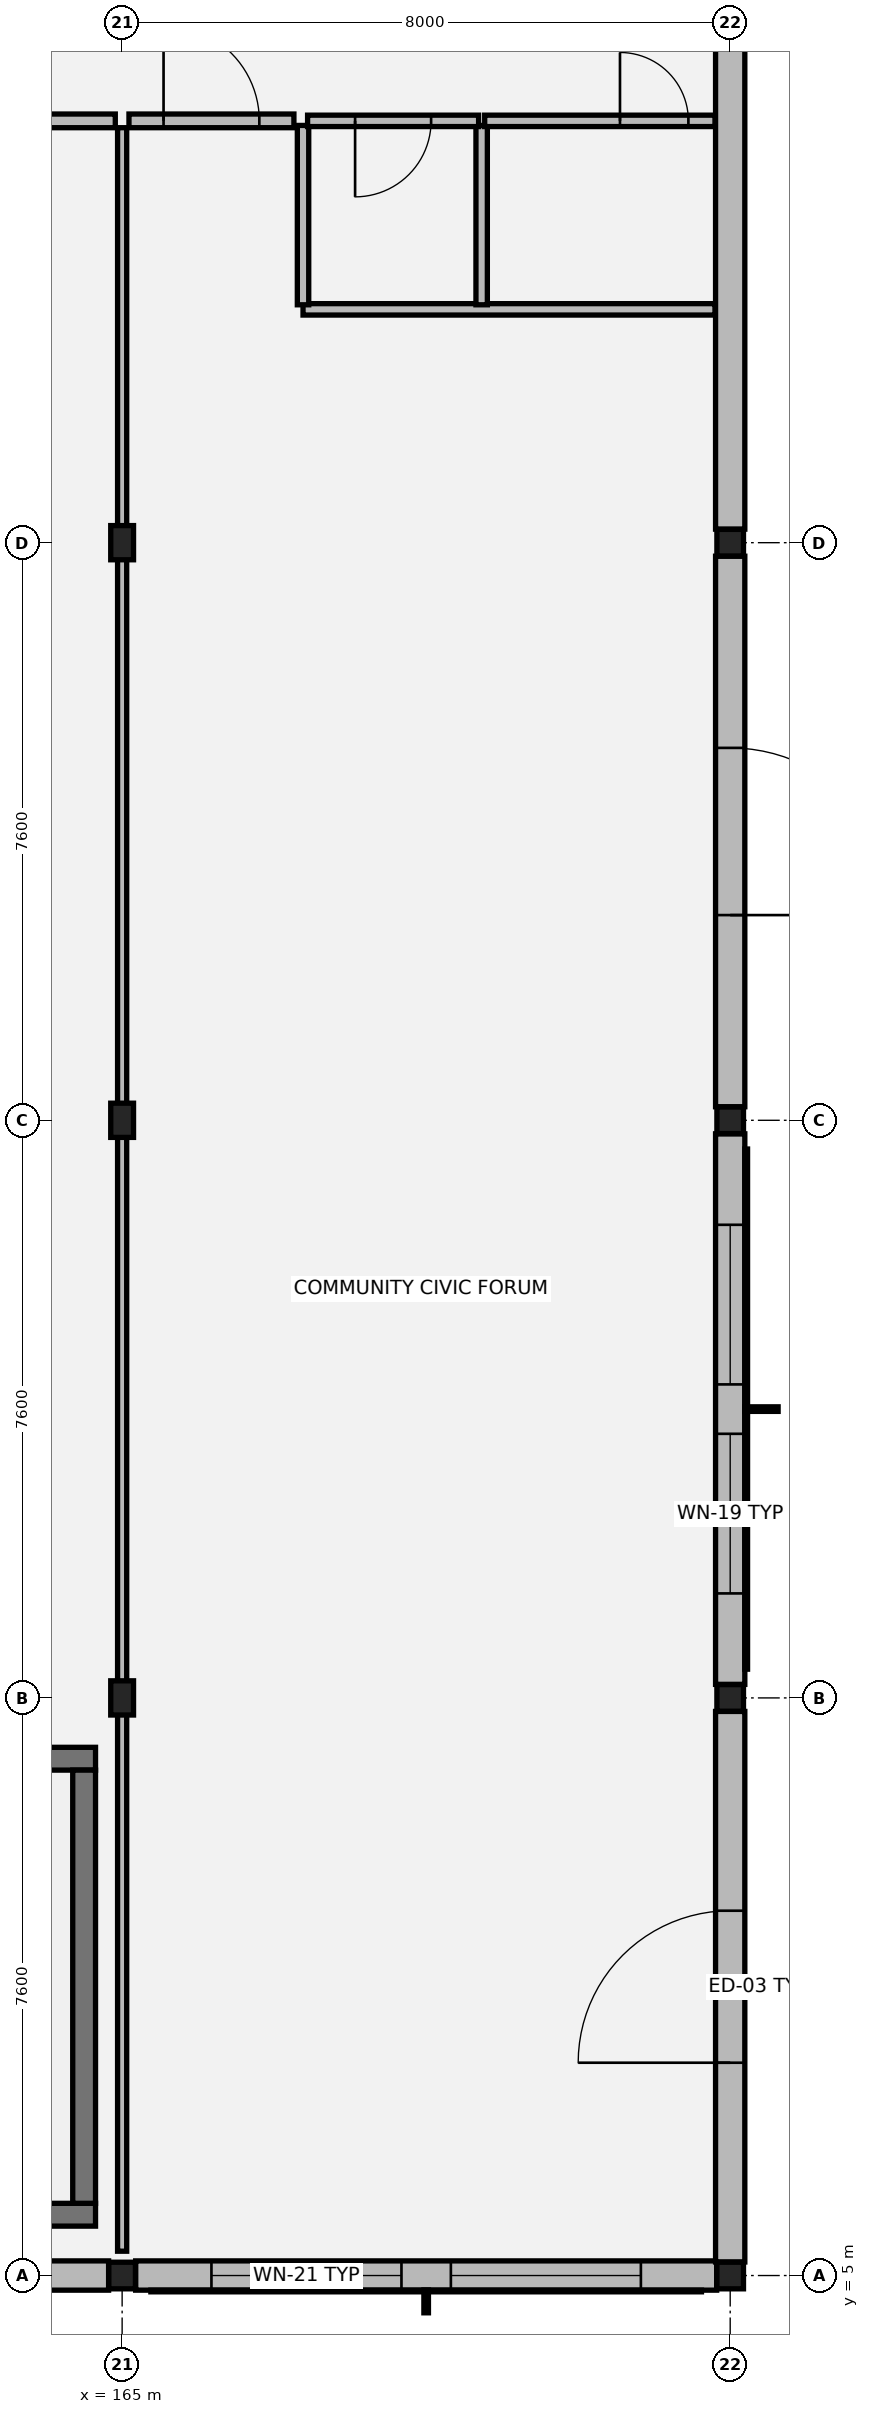
"""IFC4 building model, lengths in metres.
Left out: names, types, materials, properties, quantities, classifications, styles, units other than length and angle.
Written with IfcOpenShell. Run it as: python <this file> out.ifc"""

import sys

from ifc_helpers import new_model, si_unit, direction, frame, frame_2d, origin, origin_2d, place, context, subcontext, project, spatial, rectangle, hollow_rectangle, i_section, extrude, element, fill, save


model = new_model("IFC4")
c1 = context("Model", 3, precision=1e-05, world=origin(), true_north=direction((0.0, 1.0)))
c2 = subcontext(c1, "Body", "Model", "MODEL_VIEW")
j1 = project(units=[si_unit("LENGTHUNIT", "METRE"), si_unit("PLANEANGLEUNIT", "RADIAN")], contexts=[c1])
p1 = place(None, origin())
s1 = spatial("IfcSite", under=j1, at=p1, CompositionType="ELEMENT")
p2 = place(p1, origin())
s2 = spatial("IfcBuilding", under=s1, at=p2, CompositionType="ELEMENT")
p3 = place(p2, origin())
s3 = spatial("IfcBuildingStorey", under=s2, at=p3, CompositionType="ELEMENT", Elevation=0.0)
p4 = place(p3, frame((165.0, 5.0, 0.0), z_axis=(0.0, 0.0, 1.0), x_axis=(1.0, 0.0, 0.0)))
e1 = element("IfcColumn", 1, at=p4, inside=s3, PredefinedType="COLUMN", context=c2, shape_type="SweptSolid", body=[
    extrude(hollow_rectangle(XDim=0.35, YDim=0.35, WallThickness=0.014, at=origin_2d()), origin(), (0.0, 0.0, 1.0), 5.075),
])
for number, where, z_axis, x_axis in (
    (2, (165.0, 12.6, 0.0), (0.0, 0.0, 1.0), (1.0, 0.0, 0.0)),
    (3, (165.0, 20.2, 0.0), (0.0, 0.0, 1.0), (1.0, 0.0, 0.0)),
    (4, (165.0, 27.8, 0.0), (0.0, 0.0, 1.0), (1.0, 0.0, 0.0)),
):
    element("IfcColumn", number, at=place(p3, frame(where, z_axis=z_axis, x_axis=x_axis)), inside=s3, PredefinedType="COLUMN", context=c2, shape_type="SweptSolid", body=[
        extrude(i_section(OverallWidth=0.3, OverallDepth=0.45, WebThickness=0.014, FlangeThickness=0.026, at=origin_2d()), origin(), (0.0, 0.0, 1.0), 5.075),
    ])
for number, where, z_axis, x_axis in (
    (5, (173.0, 5.0, 0.0), (0.0, 0.0, 1.0), (1.0, 0.0, 0.0)),
    (6, (173.0, 12.6, 0.0), (0.0, 0.0, 1.0), (1.0, 0.0, 0.0)),
    (7, (173.0, 20.2, 0.0), (0.0, 0.0, 1.0), (1.0, 0.0, 0.0)),
    (8, (173.0, 27.8, 0.0), (0.0, 0.0, 1.0), (1.0, 0.0, 0.0)),
):
    element("IfcColumn", number, at=place(p3, frame(where, z_axis=z_axis, x_axis=x_axis)), inside=s3, PredefinedType="COLUMN", context=c2, shape_type="SweptSolid", body=[
        extrude(hollow_rectangle(XDim=0.35, YDim=0.35, WallThickness=0.014, at=origin_2d()), origin(), (0.0, 0.0, 1.0), 5.075),
    ])
p5 = place(p3, frame((157.178, 5.0, 0.0), z_axis=(0.0, 0.0, 1.0), x_axis=(1.0, 0.0, 0.0)))
e9 = element("IfcWall", 9, at=p5, inside=s3, PredefinedType="SOLIDWALL", context=c2, shape_type="SweptSolid", body=[
    extrude(rectangle(XDim=7.644, YDim=0.385, at=frame_2d((3.822, 0.0))), origin(), (0.0, 0.0, 1.0), 4.5),
])
p6 = place(p5, frame((2.872, 0.0, 0.0)))
e10 = element("IfcOpeningElement", 10, at=p6, cuts=e9, PredefinedType="OPENING", context=c2, shape_type="SweptSolid", body=[
    extrude(rectangle(XDim=1.9, YDim=2.42, at=frame_2d((0.95, 1.21))), frame((0.0, 0.202, 0.0), z_axis=(0.0, -1.0, 0.0), x_axis=(1.0, 0.0, 0.0)), (0.0, 0.0, 1.0), 0.405),
])
p7 = place(p3, frame((165.178, 5.0, 0.0), z_axis=(0.0, 0.0, 1.0), x_axis=(1.0, 0.0, 0.0)))
e11 = element("IfcWall", 11, at=p7, inside=s3, PredefinedType="SOLIDWALL", context=c2, shape_type="SweptSolid", body=[
    extrude(rectangle(XDim=7.644, YDim=0.385, at=frame_2d((3.822, 0.0))), origin(), (0.0, 0.0, 1.0), 4.5),
])
p8 = place(p7, frame((0.997, 0.0, 0.8)))
e12 = element("IfcOpeningElement", 12, at=p8, cuts=e11, PredefinedType="OPENING", context=c2, shape_type="SweptSolid", body=[
    extrude(rectangle(XDim=2.5, YDim=2.85, at=frame_2d((1.25, 1.425))), frame((0.0, 0.202, 0.0), z_axis=(0.0, -1.0, 0.0), x_axis=(1.0, 0.0, 0.0)), (0.0, 0.0, 1.0), 0.405),
])
p9 = place(p7, frame((4.147, 0.0, 0.8)))
e13 = element("IfcOpeningElement", 13, at=p9, cuts=e11, PredefinedType="OPENING", context=c2, shape_type="SweptSolid", body=[
    extrude(rectangle(XDim=2.5, YDim=2.85, at=frame_2d((1.25, 1.425))), frame((0.0, 0.202, 0.0), z_axis=(0.0, -1.0, 0.0), x_axis=(1.0, 0.0, 0.0)), (0.0, 0.0, 1.0), 0.405),
])
p10 = place(p3, frame((173.0, 5.178, 0.0), z_axis=(0.0, 0.0, 1.0), x_axis=(0.0, 1.0, 0.0)))
e14 = element("IfcWall", 14, at=p10, inside=s3, PredefinedType="SOLIDWALL", context=c2, shape_type="SweptSolid", body=[
    extrude(rectangle(XDim=7.244, YDim=0.385, at=frame_2d((3.622, 0.0))), origin(), (0.0, 0.0, 1.0), 4.5),
])
p11 = place(p10, frame((2.622, 0.0, 0.0)))
e15 = element("IfcOpeningElement", 15, at=p11, cuts=e14, PredefinedType="OPENING", context=c2, shape_type="SweptSolid", body=[
    extrude(rectangle(XDim=2.0, YDim=2.45, at=frame_2d((1.0, 1.225))), frame((0.0, 0.202, 0.0), z_axis=(0.0, -1.0, 0.0), x_axis=(1.0, 0.0, 0.0)), (0.0, 0.0, 1.0), 0.405),
])
p12 = place(p3, frame((173.0, 12.778, 0.0), z_axis=(0.0, 0.0, 1.0), x_axis=(0.0, 1.0, 0.0)))
e16 = element("IfcWall", 16, at=p12, inside=s3, PredefinedType="SOLIDWALL", context=c2, shape_type="SweptSolid", body=[
    extrude(rectangle(XDim=7.244, YDim=0.385, at=frame_2d((3.622, 0.0))), origin(), (0.0, 0.0, 1.0), 4.5),
])
p13 = place(p12, frame((1.197, 0.0, 0.8)))
e17 = element("IfcOpeningElement", 17, at=p13, cuts=e16, PredefinedType="OPENING", context=c2, shape_type="SweptSolid", body=[
    extrude(rectangle(XDim=2.1, YDim=2.25, at=frame_2d((1.05, 1.125))), frame((0.0, 0.202, 0.0), z_axis=(0.0, -1.0, 0.0), x_axis=(1.0, 0.0, 0.0)), (0.0, 0.0, 1.0), 0.405),
])
p14 = place(p12, frame((3.947, 0.0, 0.8)))
e18 = element("IfcOpeningElement", 18, at=p14, cuts=e16, PredefinedType="OPENING", context=c2, shape_type="SweptSolid", body=[
    extrude(rectangle(XDim=2.1, YDim=2.25, at=frame_2d((1.05, 1.125))), frame((0.0, 0.202, 0.0), z_axis=(0.0, -1.0, 0.0), x_axis=(1.0, 0.0, 0.0)), (0.0, 0.0, 1.0), 0.405),
])
p15 = place(p3, frame((173.0, 20.378, 0.0), z_axis=(0.0, 0.0, 1.0), x_axis=(0.0, 1.0, 0.0)))
e19 = element("IfcWall", 19, at=p15, inside=s3, PredefinedType="SOLIDWALL", context=c2, shape_type="SweptSolid", body=[
    extrude(rectangle(XDim=7.244, YDim=0.385, at=frame_2d((3.622, 0.0))), origin(), (0.0, 0.0, 1.0), 4.5),
])
p16 = place(p15, frame((2.522, 0.0, 0.0)))
e20 = element("IfcOpeningElement", 20, at=p16, cuts=e19, PredefinedType="OPENING", context=c2, shape_type="SweptSolid", body=[
    extrude(rectangle(XDim=2.2, YDim=2.5, at=frame_2d((1.1, 1.25))), frame((0.0, 0.202, 0.0), z_axis=(0.0, -1.0, 0.0), x_axis=(1.0, 0.0, 0.0)), (0.0, 0.0, 1.0), 0.405),
])
p17 = place(p3, frame((173.0, 27.978, 0.0), z_axis=(0.0, 0.0, 1.0), x_axis=(0.0, 1.0, 0.0)))
e21 = element("IfcWall", 21, at=p17, inside=s3, PredefinedType="SOLIDWALL", context=c2, shape_type="SweptSolid", body=[
    extrude(rectangle(XDim=7.244, YDim=0.385, at=frame_2d((3.622, 0.0))), origin(), (0.0, 0.0, 1.0), 4.5),
])
p18 = place(p3, frame((157.35, 5.8, 0.0), z_axis=(0.0, 0.0, 1.0), x_axis=(1.0, 0.0, 0.0)))
e22 = element("IfcWall", 22, at=p18, inside=s3, PredefinedType="SHEAR", context=c2, shape_type="SweptSolid", body=[
    extrude(rectangle(XDim=7.3, YDim=0.3, at=frame_2d((3.65, 0.0))), origin(), (0.0, 0.0, 1.0), 4.865),
])
p19 = place(p3, frame((157.35, 11.8, 0.0), z_axis=(0.0, 0.0, 1.0), x_axis=(1.0, 0.0, 0.0)))
e23 = element("IfcWall", 23, at=p19, inside=s3, PredefinedType="SHEAR", context=c2, shape_type="SweptSolid", body=[
    extrude(rectangle(XDim=7.3, YDim=0.3, at=frame_2d((3.65, 0.0))), origin(), (0.0, 0.0, 1.0), 4.865),
])
p20 = place(p19, frame((0.33, 0.0, 0.0)))
e24 = element("IfcOpeningElement", 24, at=p20, cuts=e23, PredefinedType="OPENING", context=c2, shape_type="SweptSolid", body=[
    extrude(rectangle(XDim=1.18, YDim=2.18, at=frame_2d((0.59, 1.09))), frame((0.0, 0.16, 0.0), z_axis=(0.0, -1.0, 0.0), x_axis=(1.0, 0.0, 0.0)), (0.0, 0.0, 1.0), 0.32),
])
p21 = place(p3, frame((164.5, 5.95, 0.0), z_axis=(0.0, 0.0, 1.0), x_axis=(0.0, 1.0, 0.0)))
e25 = element("IfcWall", 25, at=p21, inside=s3, PredefinedType="SHEAR", context=c2, shape_type="SweptSolid", body=[
    extrude(rectangle(XDim=5.7, YDim=0.3, at=frame_2d((2.85, 0.0))), origin(), (0.0, 0.0, 1.0), 4.865),
])
p22 = place(p3, frame((167.38, 30.87, 0.0), z_axis=(0.0, 0.0, 1.0), x_axis=(1.0, 0.0, 0.0)))
e26 = element("IfcWall", 26, at=p22, inside=s3, PredefinedType="PARTITIONING", context=c2, shape_type="SweptSolid", body=[
    extrude(rectangle(XDim=5.42, YDim=0.15, at=frame_2d((2.71, 0.0))), origin(), (0.0, 0.0, 1.0), 4.2),
])
for number, where, z_axis, x_axis in (
    (27, (167.38, 30.93, 0.0), (0.0, 0.0, 1.0), (0.0, 1.0, 0.0)),
    (28, (169.73, 30.93, 0.0), (0.0, 0.0, 1.0), (0.0, 1.0, 0.0)),
):
    element("IfcWall", number, at=place(p3, frame(where, z_axis=z_axis, x_axis=x_axis)), inside=s3, PredefinedType="PARTITIONING", context=c2, shape_type="SweptSolid", body=[
        extrude(rectangle(XDim=2.36, YDim=0.15, at=frame_2d((1.18, 0.0))), origin(), (0.0, 0.0, 1.0), 4.2),
    ])
p23 = place(p3, frame((167.44, 33.35, 0.0), z_axis=(0.0, 0.0, 1.0), x_axis=(1.0, 0.0, 0.0)))
e29 = element("IfcWall", 29, at=p23, inside=s3, PredefinedType="PARTITIONING", context=c2, shape_type="SweptSolid", body=[
    extrude(rectangle(XDim=2.25, YDim=0.15, at=frame_2d((1.125, 0.0))), origin(), (0.0, 0.0, 1.0), 4.2),
])
p24 = place(p23, frame((0.625, 0.0, 0.0)))
e30 = element("IfcOpeningElement", 30, at=p24, cuts=e29, PredefinedType="OPENING", context=c2, shape_type="SweptSolid", body=[
    extrude(rectangle(XDim=1.0, YDim=2.15, at=frame_2d((0.5, 1.075))), frame((0.0, 0.085, 0.0), z_axis=(0.0, -1.0, 0.0), x_axis=(1.0, 0.0, 0.0)), (0.0, 0.0, 1.0), 0.17),
])
p25 = place(p3, frame((169.77, 33.35, 0.0), z_axis=(0.0, 0.0, 1.0), x_axis=(1.0, 0.0, 0.0)))
e31 = element("IfcWall", 31, at=p25, inside=s3, PredefinedType="PARTITIONING", context=c2, shape_type="SweptSolid", body=[
    extrude(rectangle(XDim=3.03, YDim=0.15, at=frame_2d((1.515, 0.0))), origin(), (0.0, 0.0, 1.0), 4.2),
])
p26 = place(p25, frame((1.78, 0.0, 0.0)))
e32 = element("IfcOpeningElement", 32, at=p26, cuts=e31, PredefinedType="OPENING", context=c2, shape_type="SweptSolid", body=[
    extrude(rectangle(XDim=0.9, YDim=2.15, at=frame_2d((0.45, 1.075))), frame((0.0, 0.085, 0.0), z_axis=(0.0, -1.0, 0.0), x_axis=(1.0, 0.0, 0.0)), (0.0, 0.0, 1.0), 0.17),
])
p27 = place(p3, frame((159.85, 33.35, 0.0), z_axis=(0.0, 0.0, 1.0), x_axis=(1.0, 0.0, 0.0)))
e33 = element("IfcWall", 33, at=p27, inside=s3, PredefinedType="PARTITIONING", context=c2, shape_type="SweptSolid", body=[
    extrude(rectangle(XDim=5.06, YDim=0.18, at=frame_2d((2.53, 0.0))), origin(), (0.0, 0.0, 1.0), 4.2),
])
p28 = place(p3, frame((165.09, 33.35, 0.0), z_axis=(0.0, 0.0, 1.0), x_axis=(1.0, 0.0, 0.0)))
e34 = element("IfcWall", 34, at=p28, inside=s3, PredefinedType="PARTITIONING", context=c2, shape_type="SweptSolid", body=[
    extrude(rectangle(XDim=2.17, YDim=0.18, at=frame_2d((1.085, 0.0))), origin(), (0.0, 0.0, 1.0), 4.2),
])
p29 = place(p28, frame((0.455, 0.0, 0.0)))
e35 = element("IfcOpeningElement", 35, at=p29, cuts=e34, PredefinedType="OPENING", context=c2, shape_type="SweptSolid", body=[
    extrude(rectangle(XDim=1.26, YDim=2.2, at=frame_2d((0.63, 1.1))), frame((0.0, 0.1, 0.0), z_axis=(0.0, -1.0, 0.0), x_axis=(1.0, 0.0, 0.0)), (0.0, 0.0, 1.0), 0.2),
])
p30 = place(p3, frame((165.0, 5.32, 0.0), z_axis=(0.0, 0.0, 1.0), x_axis=(0.0, 1.0, 0.0)))
e36 = element("IfcWall", 36, at=p30, inside=s3, PredefinedType="PARTITIONING", context=c2, shape_type="SweptSolid", body=[
    extrude(rectangle(XDim=27.94, YDim=0.12, at=frame_2d((13.97, 0.0))), origin(), (0.0, 0.0, 1.0), 4.2),
])
p31 = place(p8, origin())
e37 = element("IfcWindow", 37, at=p31, inside=s3, PartitioningType="SINGLE_PANEL", PredefinedType="WINDOW", context=c2, shape_type="SweptSolid", body=[
    extrude(rectangle(XDim=2.5, YDim=2.85, at=frame_2d((1.25, 1.425))), frame((0.0, 0.03, 0.0), z_axis=(0.0, -1.0, 0.0), x_axis=(1.0, 0.0, 0.0)), (0.0, 0.0, 1.0), 0.06),
])
fill(e12, e37)
p32 = place(p9, origin())
e38 = element("IfcWindow", 38, at=p32, inside=s3, PartitioningType="SINGLE_PANEL", PredefinedType="WINDOW", context=c2, shape_type="SweptSolid", body=[
    extrude(rectangle(XDim=2.5, YDim=2.85, at=frame_2d((1.25, 1.425))), frame((0.0, 0.03, 0.0), z_axis=(0.0, -1.0, 0.0), x_axis=(1.0, 0.0, 0.0)), (0.0, 0.0, 1.0), 0.06),
])
fill(e13, e38)
p33 = place(p11, origin())
e39 = element("IfcDoor", 39, at=p33, inside=s3, OperationType="SINGLE_SWING_LEFT", PredefinedType="DOOR", context=c2, shape_type="SweptSolid", body=[
    extrude(rectangle(XDim=2.0, YDim=2.45, at=frame_2d((1.0, 1.225))), frame((0.0, 0.025, 0.0), z_axis=(0.0, -1.0, 0.0), x_axis=(1.0, 0.0, 0.0)), (0.0, 0.0, 1.0), 0.05),
])
fill(e15, e39)
p34 = place(p13, origin())
e40 = element("IfcWindow", 40, at=p34, inside=s3, PartitioningType="SINGLE_PANEL", PredefinedType="WINDOW", context=c2, shape_type="SweptSolid", body=[
    extrude(rectangle(XDim=2.1, YDim=2.25, at=frame_2d((1.05, 1.125))), frame((0.0, 0.03, 0.0), z_axis=(0.0, -1.0, 0.0), x_axis=(1.0, 0.0, 0.0)), (0.0, 0.0, 1.0), 0.06),
])
fill(e17, e40)
p35 = place(p14, origin())
e41 = element("IfcWindow", 41, at=p35, inside=s3, PartitioningType="SINGLE_PANEL", PredefinedType="WINDOW", context=c2, shape_type="SweptSolid", body=[
    extrude(rectangle(XDim=2.1, YDim=2.25, at=frame_2d((1.05, 1.125))), frame((0.0, 0.03, 0.0), z_axis=(0.0, -1.0, 0.0), x_axis=(1.0, 0.0, 0.0)), (0.0, 0.0, 1.0), 0.06),
])
fill(e18, e41)
p36 = place(p16, origin())
e42 = element("IfcDoor", 42, at=p36, inside=s3, OperationType="SINGLE_SWING_RIGHT", PredefinedType="DOOR", context=c2, shape_type="SweptSolid", body=[
    extrude(rectangle(XDim=2.2, YDim=2.5, at=frame_2d((1.1, 1.25))), frame((0.0, 0.025, 0.0), z_axis=(0.0, -1.0, 0.0), x_axis=(1.0, 0.0, 0.0)), (0.0, 0.0, 1.0), 0.05),
])
fill(e20, e42)
p37 = place(p24, origin())
e43 = element("IfcDoor", 43, at=p37, inside=s3, OperationType="SINGLE_SWING_RIGHT", PredefinedType="DOOR", context=c2, shape_type="SweptSolid", body=[
    extrude(rectangle(XDim=1.0, YDim=2.15, at=frame_2d((0.5, 1.075))), frame((0.0, 0.025, 0.0), z_axis=(0.0, -1.0, 0.0), x_axis=(1.0, 0.0, 0.0)), (0.0, 0.0, 1.0), 0.05),
])
fill(e30, e43)
p38 = place(p26, origin())
e44 = element("IfcDoor", 44, at=p38, inside=s3, OperationType="SINGLE_SWING_LEFT", PredefinedType="DOOR", context=c2, shape_type="SweptSolid", body=[
    extrude(rectangle(XDim=0.9, YDim=2.15, at=frame_2d((0.45, 1.075))), frame((0.0, 0.025, 0.0), z_axis=(0.0, -1.0, 0.0), x_axis=(1.0, 0.0, 0.0)), (0.0, 0.0, 1.0), 0.05),
])
fill(e32, e44)
p39 = place(p29, origin())
e45 = element("IfcDoor", 45, at=p39, inside=s3, OperationType="SINGLE_SWING_LEFT", PredefinedType="DOOR", context=c2, shape_type="SweptSolid", body=[
    extrude(rectangle(XDim=1.26, YDim=2.2, at=frame_2d((0.63, 1.1))), frame((0.0, 0.025, 0.0), z_axis=(0.0, -1.0, 0.0), x_axis=(1.0, 0.0, 0.0)), (0.0, 0.0, 1.0), 0.05),
])
fill(e35, e45)
save(model, sys.argv[1])
